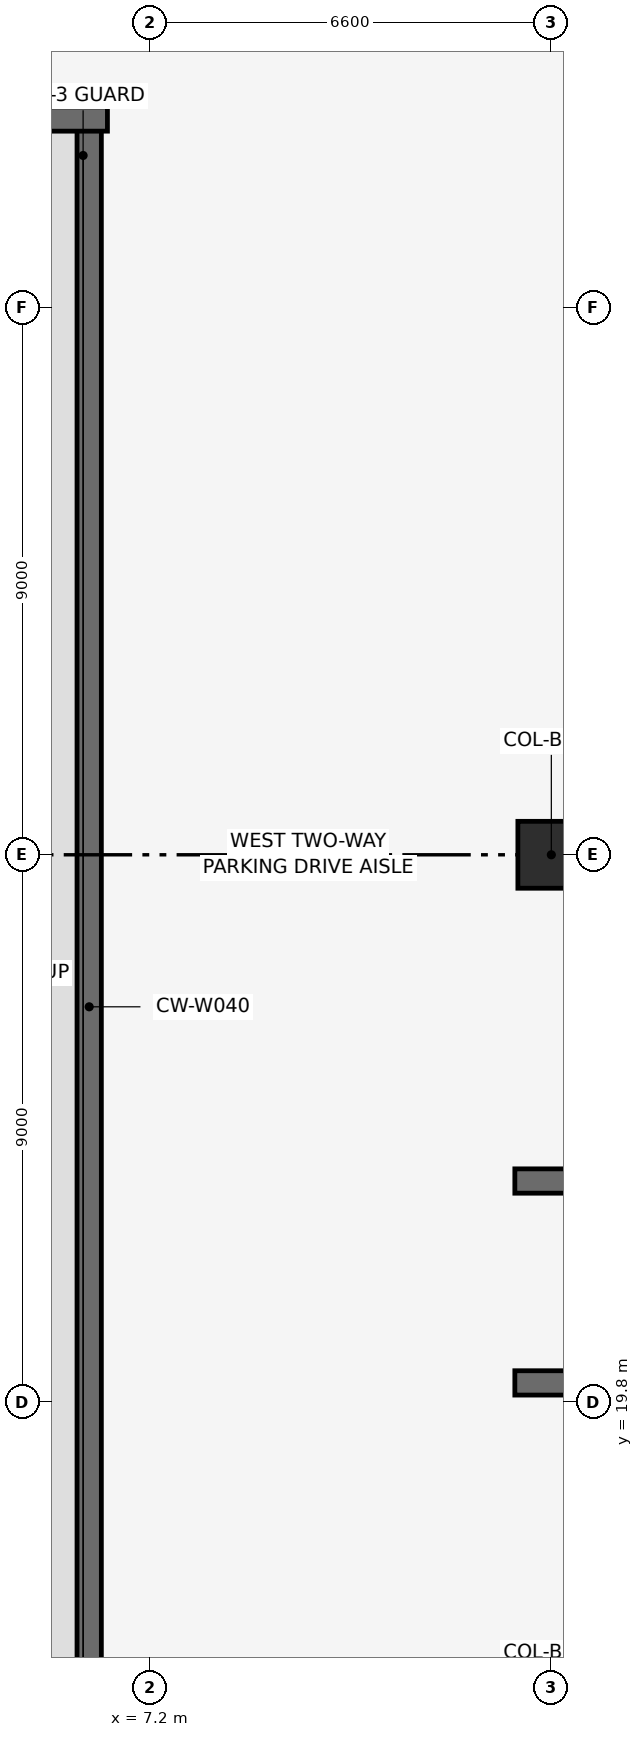
"""IFC4 building model, lengths in metres.
Left out: names, types, materials, properties, quantities, classifications, styles, units other than length and angle.
Written with IfcOpenShell. Run it as: python <this file> out.ifc"""

import sys

from ifc_helpers import new_model, si_unit, direction, frame, frame_2d, origin, origin_2d, place, context, subcontext, project, spatial, rectangle, extrude, element, save


model = new_model("IFC4")
c1 = context("Model", 3, precision=1e-05, world=origin(), true_north=direction((0.0, 1.0)))
c2 = subcontext(c1, "Body", "Model", "MODEL_VIEW")
j1 = project(units=[si_unit("LENGTHUNIT", "METRE"), si_unit("PLANEANGLEUNIT", "RADIAN")], contexts=[c1])
p1 = place(None, origin())
s1 = spatial("IfcSite", under=j1, at=p1, CompositionType="ELEMENT")
p2 = place(p1, origin())
s2 = spatial("IfcBuilding", under=s1, at=p2, CompositionType="ELEMENT")
p3 = place(p2, frame((0.0, 0.0, -4.8)))
s3 = spatial("IfcBuildingStorey", under=s2, at=p3, CompositionType="ELEMENT", Elevation=-4.8)
p4 = place(p3, frame((13.8, 28.8, 0.002), z_axis=(0.0, 0.0, 1.0), x_axis=(1.0, 0.0, 0.0)))
e1 = element("IfcColumn", 1, at=p4, inside=s3, PredefinedType="COLUMN", context=c2, shape_type="SweptSolid", body=[
    extrude(rectangle(XDim=1.1, YDim=1.1, at=origin_2d()), origin(), (0.0, 0.0, 1.0), 4.796),
])
p5 = place(p3, frame((6.2, 11.6, 0.0), z_axis=(0.0, 0.0, 1.0), x_axis=(0.0, 1.0, 0.0)))
e2 = element("IfcWall", 2, at=p5, inside=s3, PredefinedType="SHEAR", context=c2, shape_type="SweptSolid", body=[
    extrude(rectangle(XDim=29.4, YDim=0.4, at=frame_2d((14.7, 0.0))), origin(), (0.0, 0.0, 1.0), 4.78),
])
p6 = place(p3, frame((0.5, 40.9, 0.0), z_axis=(0.0, 0.0, 1.0), x_axis=(1.0, 0.0, 0.0)))
e3 = element("IfcWall", 3, at=p6, inside=s3, PredefinedType="SHEAR", context=c2, shape_type="SweptSolid", body=[
    extrude(rectangle(XDim=6.0, YDim=0.4, at=frame_2d((3.0, 0.0))), origin(), (0.0, 0.0, 1.0), 4.78),
])
for number, where, z_axis, x_axis in (
    (4, (13.2, 20.115, 0.002), (0.0, 0.0, 1.0), (1.0, 0.0, 0.0)),
    (5, (13.2, 23.435, 0.002), (0.0, 0.0, 1.0), (1.0, 0.0, 0.0)),
):
    element("IfcWall", number, at=place(p3, frame(where, z_axis=z_axis, x_axis=x_axis)), inside=s3, PredefinedType="SHEAR", context=c2, shape_type="SweptSolid", body=[
        extrude(rectangle(XDim=4.7, YDim=0.4, at=frame_2d((2.35, 0.0))), origin(), (0.0, 0.0, 1.0), 4.396),
    ])
save(model, sys.argv[1])
